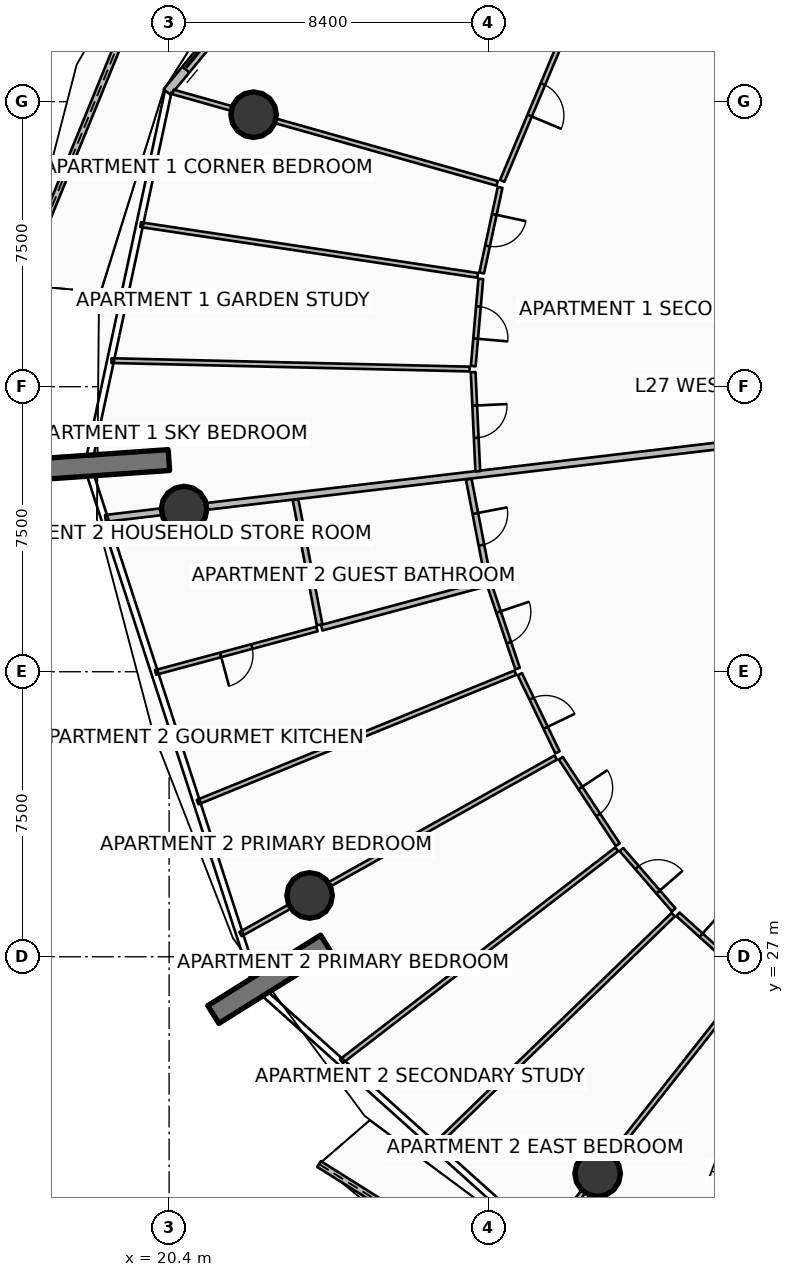
"""IFC4 building model, lengths in metres.
Left out: names, types, materials, properties, quantities, classifications, styles, units other than length and angle.
Written with IfcOpenShell. Run it as: python <this file> out.ifc"""

import sys

from ifc_helpers import new_model, si_unit, direction, frame, frame_2d, origin, origin_2d, place, context, subcontext, project, spatial, polyline, rectangle, circle, outline, extrude, element, fill, save


model = new_model("IFC4")
c1 = context("Model", 3, precision=1e-05, world=origin(), true_north=direction((0.0, 1.0)))
c2 = subcontext(c1, "Body", "Model", "MODEL_VIEW")
j1 = project(units=[si_unit("LENGTHUNIT", "METRE"), si_unit("PLANEANGLEUNIT", "RADIAN")], contexts=[c1])
p1 = place(None, origin())
s1 = spatial("IfcSite", under=j1, at=p1, CompositionType="ELEMENT")
p2 = place(p1, origin())
s2 = spatial("IfcBuilding", under=s1, at=p2, CompositionType="ELEMENT")
p3 = place(p2, frame((0.0, 0.0, 108.9)))
s3 = spatial("IfcBuildingStorey", under=s2, at=p3, CompositionType="ELEMENT", Elevation=108.9)
for number, where, z_axis, x_axis in (
    (1, (20.394, 40.07, 0.0), (0.0, 0.0, 1.0), (-0.998, -0.07, 0.0)),
    (2, (24.531, 27.335, 0.0), (0.0, 0.0, 1.0), (-0.848, -0.53, 0.0)),
):
    element("IfcWall", number, at=place(p3, frame(where, z_axis=z_axis, x_axis=x_axis)), inside=s3, PredefinedType="SOLIDWALL", context=c2, shape_type="SweptSolid", body=[
        extrude(rectangle(XDim=3.5, YDim=0.55, at=frame_2d((1.75, 0.0))), origin(), (0.0, 0.0, 1.0), 3.75),
    ])
for number, where, z_axis, x_axis in (
    (3, (22.623, 49.157, 0.0), (0.0, 0.0, 1.0), (1.0, 0.0, 0.0)),
    (4, (20.793, 38.78, 0.0), (0.0, 0.0, 1.0), (1.0, 0.0, 0.0)),
    (5, (24.097, 28.614, 0.0), (0.0, 0.0, 1.0), (1.0, 0.0, 0.0)),
    (6, (31.677, 21.294, 0.0), (0.0, 0.0, 1.0), (1.0, 0.0, 0.0)),
):
    element("IfcColumn", number, at=place(p3, frame(where, z_axis=z_axis, x_axis=x_axis)), inside=s3, PredefinedType="COLUMN", context=c2, shape_type="SweptSolid", body=[
        extrude(circle(Radius=0.6, at=origin_2d()), origin(), (0.0, 0.0, 1.0), 3.5),
    ])
p4 = place(p3, frame((20.954, 55.646, 0.0), z_axis=(0.0, 0.0, 1.0), x_axis=(-0.378274271274, -0.925693564681, 0.0)))
e7 = element("IfcWall", 7, at=p4, inside=s3, PredefinedType="PARAPET", context=c2, shape_type="SweptSolid", body=[
    extrude(outline(polyline([(0.0, 0.0), (11.852, 0.0), (11.852, 1.497), (5.926, 1.696), (0.0, 1.832), (0.0, 0.0)])), frame((0.0, 0.09, 0.0), z_axis=(0.0, -1.0, 0.0), x_axis=(1.0, 0.0, 0.0)), (0.0, 0.0, 1.0), 0.18),
])
p5 = place(p3, frame((24.345, 21.546, 0.0), z_axis=(0.0, 0.0, 1.0), x_axis=(0.846860965628, -0.531814351908, 0.0)))
e8 = element("IfcWall", 8, at=p5, inside=s3, PredefinedType="PARAPET", context=c2, shape_type="SweptSolid", body=[
    extrude(outline(polyline([(0.0, 0.0), (11.718, 0.0), (11.718, 1.632), (5.859, 1.418), (0.0, 1.233), (0.0, 0.0)])), frame((0.0, 0.09, 0.0), z_axis=(0.0, -1.0, 0.0), x_axis=(1.0, 0.0, 0.0)), (0.0, 0.0, 1.0), 0.18),
])
p6 = place(p3, frame((27.407, 58.298, 0.0), z_axis=(0.0, 0.0, 1.0), x_axis=(-0.636704975, -0.771107498868, 0.0)))
e9 = element("IfcWall", 9, at=p6, inside=s3, PredefinedType="SOLIDWALL", context=c2, shape_type="SweptSolid", body=[
    extrude(rectangle(XDim=11.084, YDim=0.24, at=frame_2d((5.542, 0.0))), origin(), (0.0, 0.0, 1.0), 2.45),
])
p7 = place(p6, frame((8.864, 0.0, 0.0)))
e10 = element("IfcOpeningElement", 10, at=p7, cuts=e9, PredefinedType="OPENING", context=c2, shape_type="SweptSolid", body=[
    extrude(rectangle(XDim=1.45, YDim=2.15, at=frame_2d((0.725, 1.075))), frame((0.0, 0.13, 0.0), z_axis=(0.0, -1.0, 0.0), x_axis=(1.0, 0.0, 0.0)), (0.0, 0.0, 1.0), 0.26),
])
p8 = place(p6, frame((0.28, 0.0, 0.65)))
e11 = element("IfcOpeningElement", 11, at=p8, cuts=e9, PredefinedType="OPENING", context=c2, shape_type="SweptSolid", body=[
    extrude(rectangle(XDim=1.6, YDim=1.5, at=frame_2d((0.8, 0.75))), frame((0.0, 0.13, 0.0), z_axis=(0.0, -1.0, 0.0), x_axis=(1.0, 0.0, 0.0)), (0.0, 0.0, 1.0), 0.26),
])
p9 = place(p3, frame((35.091, 40.472, 0.0), z_axis=(0.0, 0.0, 1.0), x_axis=(-0.99306845132, -0.117537445069, 0.0)))
e12 = element("IfcWall", 12, at=p9, inside=s3, PredefinedType="PARTITIONING", context=c2, shape_type="SweptSolid", body=[
    extrude(rectangle(XDim=16.48, YDim=0.18, at=frame_2d((8.24, 0.0))), origin(), (0.0, 0.0, 1.0), 2.94),
])
p10 = place(p3, frame((30.959, 51.682, 0.0), z_axis=(0.0, 0.0, 1.0), x_axis=(-0.387377754923, -0.921921078505, 0.0)))
e13 = element("IfcWall", 13, at=p10, inside=s3, PredefinedType="PARTITIONING", context=c2, shape_type="SweptSolid", body=[
    extrude(rectangle(XDim=4.628, YDim=0.125, at=frame_2d((2.314, 0.0))), origin(), (0.0, 0.0, 1.0), 2.94),
])
p11 = place(p10, frame((1.864, 0.0, 0.0)))
e14 = element("IfcOpeningElement", 14, at=p11, cuts=e13, PredefinedType="OPENING", context=c2, shape_type="SweptSolid", body=[
    extrude(rectangle(XDim=0.9, YDim=2.08, at=frame_2d((0.45, 1.04))), frame((0.0, 0.073, 0.0), z_axis=(0.0, -1.0, 0.0), x_axis=(1.0, 0.0, 0.0)), (0.0, 0.0, 1.0), 0.145),
])
p12 = place(p3, frame((29.031, 47.35, 0.0), z_axis=(0.0, 0.0, 1.0), x_axis=(-0.962455027906, 0.271441189317, 0.0)))
e15 = element("IfcWall", 15, at=p12, inside=s3, PredefinedType="PARTITIONING", context=c2, shape_type="SweptSolid", body=[
    extrude(rectangle(XDim=8.862, YDim=0.125, at=frame_2d((4.431, 0.0))), origin(), (0.0, 0.0, 1.0), 2.94),
])
p13 = place(p3, frame((28.52, 44.929, 0.0), z_axis=(0.0, 0.0, 1.0), x_axis=(-0.988886383278, 0.148673201912, 0.0)))
e16 = element("IfcWall", 16, at=p13, inside=s3, PredefinedType="PARTITIONING", context=c2, shape_type="SweptSolid", body=[
    extrude(rectangle(XDim=8.969, YDim=0.125, at=frame_2d((4.485, 0.0))), origin(), (0.0, 0.0, 1.0), 2.94),
])
p14 = place(p3, frame((28.306, 42.464, 0.0), z_axis=(0.0, 0.0, 1.0), x_axis=(-0.999722179252, 0.023570411771, 0.0)))
e17 = element("IfcWall", 17, at=p14, inside=s3, PredefinedType="PARTITIONING", context=c2, shape_type="SweptSolid", body=[
    extrude(rectangle(XDim=9.426, YDim=0.125, at=frame_2d((4.713, 0.0))), origin(), (0.0, 0.0, 1.0), 2.94),
])
p15 = place(p3, frame((29.11, 47.244, 0.0), z_axis=(0.0, 0.0, 1.0), x_axis=(-0.210470334655, -0.977600244594, 0.0)))
e18 = element("IfcWall", 18, at=p15, inside=s3, PredefinedType="PARTITIONING", context=c2, shape_type="SweptSolid", body=[
    extrude(rectangle(XDim=2.302, YDim=0.125, at=frame_2d((1.151, 0.0))), origin(), (0.0, 0.0, 1.0), 2.94),
])
p16 = place(p15, frame((0.726, 0.0, 0.0)))
e19 = element("IfcOpeningElement", 19, at=p16, cuts=e18, PredefinedType="OPENING", context=c2, shape_type="SweptSolid", body=[
    extrude(rectangle(XDim=0.85, YDim=2.06, at=frame_2d((0.425, 1.03))), frame((0.0, 0.073, 0.0), z_axis=(0.0, -1.0, 0.0), x_axis=(1.0, 0.0, 0.0)), (0.0, 0.0, 1.0), 0.145),
])
p17 = place(p3, frame((28.602, 44.836, 0.0), z_axis=(0.0, 0.0, 1.0), x_axis=(-0.086309330274, -0.996268387287, 0.0)))
e20 = element("IfcWall", 20, at=p17, inside=s3, PredefinedType="PARTITIONING", context=c2, shape_type="SweptSolid", body=[
    extrude(rectangle(XDim=2.302, YDim=0.125, at=frame_2d((1.151, 0.0))), origin(), (0.0, 0.0, 1.0), 2.94),
])
p18 = place(p17, frame((0.726, 0.0, 0.0)))
e21 = element("IfcOpeningElement", 21, at=p18, cuts=e20, PredefinedType="OPENING", context=c2, shape_type="SweptSolid", body=[
    extrude(rectangle(XDim=0.85, YDim=2.06, at=frame_2d((0.425, 1.03))), frame((0.0, 0.073, 0.0), z_axis=(0.0, -1.0, 0.0), x_axis=(1.0, 0.0, 0.0)), (0.0, 0.0, 1.0), 0.145),
])
p19 = place(p3, frame((28.4, 42.382, 0.0), z_axis=(0.0, 0.0, 1.0), x_axis=(0.047147361322, -0.998887944827, 0.0)))
e22 = element("IfcWall", 22, at=p19, inside=s3, PredefinedType="PARTITIONING", context=c2, shape_type="SweptSolid", body=[
    extrude(rectangle(XDim=2.61, YDim=0.125, at=frame_2d((1.305, 0.0))), origin(), (0.0, 0.0, 1.0), 2.94),
])
p20 = place(p19, frame((0.88, 0.0, 0.0)))
e23 = element("IfcOpeningElement", 23, at=p20, cuts=e22, PredefinedType="OPENING", context=c2, shape_type="SweptSolid", body=[
    extrude(rectangle(XDim=0.85, YDim=2.06, at=frame_2d((0.425, 1.03))), frame((0.0, 0.073, 0.0), z_axis=(0.0, -1.0, 0.0), x_axis=(1.0, 0.0, 0.0)), (0.0, 0.0, 1.0), 0.145),
])
p21 = place(p3, frame((28.285, 39.566, 0.0), z_axis=(0.0, 0.0, 1.0), x_axis=(0.189069796262, -0.98196365113, 0.0)))
e24 = element("IfcWall", 24, at=p21, inside=s3, PredefinedType="PARTITIONING", context=c2, shape_type="SweptSolid", body=[
    extrude(rectangle(XDim=2.687, YDim=0.15, at=frame_2d((1.344, 0.0))), origin(), (0.0, 0.0, 1.0), 2.94),
])
p22 = place(p21, frame((0.918, 0.0, 0.0)))
e25 = element("IfcOpeningElement", 25, at=p22, cuts=e24, PredefinedType="OPENING", context=c2, shape_type="SweptSolid", body=[
    extrude(rectangle(XDim=0.85, YDim=2.06, at=frame_2d((0.425, 1.03))), frame((0.0, 0.085, 0.0), z_axis=(0.0, -1.0, 0.0), x_axis=(1.0, 0.0, 0.0)), (0.0, 0.0, 1.0), 0.17),
])
p23 = place(p3, frame((23.727, 39.027, 0.0), z_axis=(0.0, 0.0, 1.0), x_axis=(0.189106762553, -0.981956532825, 0.0)))
e26 = element("IfcWall", 26, at=p23, inside=s3, PredefinedType="PARTITIONING", context=c2, shape_type="SweptSolid", body=[
    extrude(rectangle(XDim=3.352, YDim=0.15, at=frame_2d((1.676, 0.0))), origin(), (0.0, 0.0, 1.0), 2.94),
])
p24 = place(p3, frame((28.723, 36.816, 0.0), z_axis=(0.0, 0.0, 1.0), x_axis=(-0.965677569119, -0.259743782409, 0.0)))
e27 = element("IfcWall", 27, at=p24, inside=s3, PredefinedType="PARTITIONING", context=c2, shape_type="SweptSolid", body=[
    extrude(rectangle(XDim=4.46, YDim=0.15, at=frame_2d((2.23, 0.0))), origin(), (0.0, 0.0, 1.0), 2.94),
])
p25 = place(p3, frame((24.29, 35.624, 0.0), z_axis=(0.0, 0.0, 1.0), x_axis=(-0.965686463705, -0.259710711787, 0.0)))
e28 = element("IfcWall", 28, at=p25, inside=s3, PredefinedType="PARTITIONING", context=c2, shape_type="SweptSolid", body=[
    extrude(rectangle(XDim=4.398, YDim=0.125, at=frame_2d((2.199, 0.0))), origin(), (0.0, 0.0, 1.0), 2.94),
])
p26 = place(p25, frame((1.774, 0.0, 0.0)))
e29 = element("IfcOpeningElement", 29, at=p26, cuts=e28, PredefinedType="OPENING", context=c2, shape_type="SweptSolid", body=[
    extrude(rectangle(XDim=0.85, YDim=2.06, at=frame_2d((0.425, 1.03))), frame((0.0, 0.073, 0.0), z_axis=(0.0, -1.0, 0.0), x_axis=(1.0, 0.0, 0.0)), (0.0, 0.0, 1.0), 0.145),
])
p27 = place(p3, frame((29.511, 34.473, 0.0), z_axis=(0.0, 0.0, 1.0), x_axis=(-0.926185438401, -0.37706834088, 0.0)))
e30 = element("IfcWall", 30, at=p27, inside=s3, PredefinedType="PARTITIONING", context=c2, shape_type="SweptSolid", body=[
    extrude(rectangle(XDim=9.026, YDim=0.125, at=frame_2d((4.513, 0.0))), origin(), (0.0, 0.0, 1.0), 2.94),
])
p28 = place(p3, frame((28.838, 36.754, 0.0), z_axis=(0.0, 0.0, 1.0), x_axis=(0.31900826941, -0.947751931704, 0.0)))
e31 = element("IfcWall", 31, at=p28, inside=s3, PredefinedType="PARTITIONING", context=c2, shape_type="SweptSolid", body=[
    extrude(rectangle(XDim=2.291, YDim=0.125, at=frame_2d((1.145, 0.0))), origin(), (0.0, 0.0, 1.0), 2.94),
])
p29 = place(p28, frame((0.72, 0.0, 0.0)))
e32 = element("IfcOpeningElement", 32, at=p29, cuts=e31, PredefinedType="OPENING", context=c2, shape_type="SweptSolid", body=[
    extrude(rectangle(XDim=0.85, YDim=2.06, at=frame_2d((0.425, 1.03))), frame((0.0, 0.073, 0.0), z_axis=(0.0, -1.0, 0.0), x_axis=(1.0, 0.0, 0.0)), (0.0, 0.0, 1.0), 0.145),
])
p30 = place(p3, frame((29.629, 34.435, 0.0), z_axis=(0.0, 0.0, 1.0), x_axis=(0.433673987986, -0.901069848649, 0.0)))
e33 = element("IfcWall", 33, at=p30, inside=s3, PredefinedType="PARTITIONING", context=c2, shape_type="SweptSolid", body=[
    extrude(rectangle(XDim=2.281, YDim=0.125, at=frame_2d((1.14, 0.0))), origin(), (0.0, 0.0, 1.0), 2.94),
])
p31 = place(p30, frame((0.715, 0.0, 0.0)))
e34 = element("IfcOpeningElement", 34, at=p31, cuts=e33, PredefinedType="OPENING", context=c2, shape_type="SweptSolid", body=[
    extrude(rectangle(XDim=0.85, YDim=2.06, at=frame_2d((0.425, 1.03))), frame((0.0, 0.073, 0.0), z_axis=(0.0, -1.0, 0.0), x_axis=(1.0, 0.0, 0.0)), (0.0, 0.0, 1.0), 0.145),
])
p32 = place(p3, frame((30.575, 32.241, 0.0), z_axis=(0.0, 0.0, 1.0), x_axis=(-0.872502512898, -0.488609624328, 0.0)))
e35 = element("IfcWall", 35, at=p32, inside=s3, PredefinedType="PARTITIONING", context=c2, shape_type="SweptSolid", body=[
    extrude(rectangle(XDim=9.508, YDim=0.125, at=frame_2d((4.754, 0.0))), origin(), (0.0, 0.0, 1.0), 2.94),
])
p33 = place(p3, frame((32.179, 29.827, 0.0), z_axis=(0.0, 0.0, 1.0), x_axis=(-0.792545547833, -0.609812720932, 0.0)))
e36 = element("IfcWall", 36, at=p33, inside=s3, PredefinedType="PARTITIONING", context=c2, shape_type="SweptSolid", body=[
    extrude(rectangle(XDim=9.141, YDim=0.125, at=frame_2d((4.571, 0.0))), origin(), (0.0, 0.0, 1.0), 2.94),
])
p34 = place(p3, frame((33.665, 28.108, 0.0), z_axis=(0.0, 0.0, 1.0), x_axis=(-0.718119545748, -0.695919764064, 0.0)))
e37 = element("IfcWall", 37, at=p34, inside=s3, PredefinedType="PARTITIONING", context=c2, shape_type="SweptSolid", body=[
    extrude(rectangle(XDim=8.721, YDim=0.125, at=frame_2d((4.36, 0.0))), origin(), (0.0, 0.0, 1.0), 2.94),
])
p35 = place(p3, frame((30.706, 32.223, 0.0), z_axis=(0.0, 0.0, 1.0), x_axis=(0.550682420902, -0.834714844309, 0.0)))
e38 = element("IfcWall", 38, at=p35, inside=s3, PredefinedType="PARTITIONING", context=c2, shape_type="SweptSolid", body=[
    extrude(rectangle(XDim=2.725, YDim=0.125, at=frame_2d((1.362, 0.0))), origin(), (0.0, 0.0, 1.0), 2.94),
])
p36 = place(p35, frame((0.937, 0.0, 0.0)))
e39 = element("IfcOpeningElement", 39, at=p36, cuts=e38, PredefinedType="OPENING", context=c2, shape_type="SweptSolid", body=[
    extrude(rectangle(XDim=0.85, YDim=2.06, at=frame_2d((0.425, 1.03))), frame((0.0, 0.073, 0.0), z_axis=(0.0, -1.0, 0.0), x_axis=(1.0, 0.0, 0.0)), (0.0, 0.0, 1.0), 0.145),
])
p37 = place(p3, frame((32.302, 29.822, 0.0), z_axis=(0.0, 0.0, 1.0), x_axis=(0.653904073591, -0.756577466318, 0.0)))
e40 = element("IfcWall", 40, at=p37, inside=s3, PredefinedType="PARTITIONING", context=c2, shape_type="SweptSolid", body=[
    extrude(rectangle(XDim=2.102, YDim=0.125, at=frame_2d((1.051, 0.0))), origin(), (0.0, 0.0, 1.0), 2.94),
])
p38 = place(p37, frame((0.626, 0.0, 0.0)))
e41 = element("IfcOpeningElement", 41, at=p38, cuts=e40, PredefinedType="OPENING", context=c2, shape_type="SweptSolid", body=[
    extrude(rectangle(XDim=0.85, YDim=2.06, at=frame_2d((0.425, 1.03))), frame((0.0, 0.073, 0.0), z_axis=(0.0, -1.0, 0.0), x_axis=(1.0, 0.0, 0.0)), (0.0, 0.0, 1.0), 0.145),
])
p39 = place(p3, frame((33.789, 28.117, 0.0), z_axis=(0.0, 0.0, 1.0), x_axis=(0.742250438722, -0.670122590439, 0.0)))
e42 = element("IfcWall", 42, at=p39, inside=s3, PredefinedType="PARTITIONING", context=c2, shape_type="SweptSolid", body=[
    extrude(rectangle(XDim=2.491, YDim=0.125, at=frame_2d((1.246, 0.0))), origin(), (0.0, 0.0, 1.0), 2.94),
])
p40 = place(p39, frame((0.821, 0.0, 0.0)))
e43 = element("IfcOpeningElement", 43, at=p40, cuts=e42, PredefinedType="OPENING", context=c2, shape_type="SweptSolid", body=[
    extrude(rectangle(XDim=0.85, YDim=2.06, at=frame_2d((0.425, 1.03))), frame((0.0, 0.073, 0.0), z_axis=(0.0, -1.0, 0.0), x_axis=(1.0, 0.0, 0.0)), (0.0, 0.0, 1.0), 0.145),
])
p41 = place(p3, frame((35.635, 26.316, 0.0), z_axis=(0.0, 0.0, 1.0), x_axis=(-0.619089966413, -0.785320070727, 0.0)))
e44 = element("IfcWall", 44, at=p41, inside=s3, PredefinedType="PARTITIONING", context=c2, shape_type="SweptSolid", body=[
    extrude(rectangle(XDim=8.699, YDim=0.125, at=frame_2d((4.35, 0.0))), origin(), (0.0, 0.0, 1.0), 2.94),
])
p42 = place(p3, frame((38.028, 24.707, 0.0), z_axis=(0.0, 0.0, 1.0), x_axis=(-0.499570967342, -0.866272964249, 0.0)))
e45 = element("IfcWall", 45, at=p42, inside=s3, PredefinedType="PARTITIONING", context=c2, shape_type="SweptSolid", body=[
    extrude(rectangle(XDim=7.162, YDim=0.125, at=frame_2d((3.581, 0.0))), origin(), (0.0, 0.0, 1.0), 2.94),
])
p43 = place(p7, origin())
e46 = element("IfcDoor", 46, at=p43, inside=s3, OperationType="DOUBLE_DOOR_SLIDING", PredefinedType="DOOR", context=c2, shape_type="SweptSolid", body=[
    extrude(rectangle(XDim=1.45, YDim=2.15, at=frame_2d((0.725, 1.075))), frame((0.0, 0.025, 0.0), z_axis=(0.0, -1.0, 0.0), x_axis=(1.0, 0.0, 0.0)), (0.0, 0.0, 1.0), 0.05),
])
fill(e10, e46)
p44 = place(p11, origin())
e47 = element("IfcDoor", 47, at=p44, inside=s3, OperationType="SINGLE_SWING_RIGHT", PredefinedType="DOOR", context=c2, shape_type="SweptSolid", body=[
    extrude(rectangle(XDim=0.9, YDim=2.08, at=frame_2d((0.45, 1.04))), frame((0.0, 0.025, 0.0), z_axis=(0.0, -1.0, 0.0), x_axis=(1.0, 0.0, 0.0)), (0.0, 0.0, 1.0), 0.05),
])
fill(e14, e47)
p45 = place(p16, origin())
e48 = element("IfcDoor", 48, at=p45, inside=s3, OperationType="SINGLE_SWING_LEFT", PredefinedType="DOOR", context=c2, shape_type="SweptSolid", body=[
    extrude(rectangle(XDim=0.85, YDim=2.06, at=frame_2d((0.425, 1.03))), frame((0.0, 0.025, 0.0), z_axis=(0.0, -1.0, 0.0), x_axis=(1.0, 0.0, 0.0)), (0.0, 0.0, 1.0), 0.05),
])
fill(e19, e48)
p46 = place(p18, origin())
e49 = element("IfcDoor", 49, at=p46, inside=s3, OperationType="SINGLE_SWING_RIGHT", PredefinedType="DOOR", context=c2, shape_type="SweptSolid", body=[
    extrude(rectangle(XDim=0.85, YDim=2.06, at=frame_2d((0.425, 1.03))), frame((0.0, 0.025, 0.0), z_axis=(0.0, -1.0, 0.0), x_axis=(1.0, 0.0, 0.0)), (0.0, 0.0, 1.0), 0.05),
])
fill(e21, e49)
p47 = place(p20, origin())
e50 = element("IfcDoor", 50, at=p47, inside=s3, OperationType="SINGLE_SWING_LEFT", PredefinedType="DOOR", context=c2, shape_type="SweptSolid", body=[
    extrude(rectangle(XDim=0.85, YDim=2.06, at=frame_2d((0.425, 1.03))), frame((0.0, 0.025, 0.0), z_axis=(0.0, -1.0, 0.0), x_axis=(1.0, 0.0, 0.0)), (0.0, 0.0, 1.0), 0.05),
])
fill(e23, e50)
p48 = place(p22, origin())
e51 = element("IfcDoor", 51, at=p48, inside=s3, OperationType="SINGLE_SWING_LEFT", PredefinedType="DOOR", context=c2, shape_type="SweptSolid", body=[
    extrude(rectangle(XDim=0.85, YDim=2.06, at=frame_2d((0.425, 1.03))), frame((0.0, 0.025, 0.0), z_axis=(0.0, -1.0, 0.0), x_axis=(1.0, 0.0, 0.0)), (0.0, 0.0, 1.0), 0.05),
])
fill(e25, e51)
p49 = place(p26, origin())
e52 = element("IfcDoor", 52, at=p49, inside=s3, OperationType="SINGLE_SWING_RIGHT", PredefinedType="DOOR", context=c2, shape_type="SweptSolid", body=[
    extrude(rectangle(XDim=0.85, YDim=2.06, at=frame_2d((0.425, 1.03))), frame((0.0, 0.025, 0.0), z_axis=(0.0, -1.0, 0.0), x_axis=(1.0, 0.0, 0.0)), (0.0, 0.0, 1.0), 0.05),
])
fill(e29, e52)
p50 = place(p29, origin())
e53 = element("IfcDoor", 53, at=p50, inside=s3, OperationType="SINGLE_SWING_LEFT", PredefinedType="DOOR", context=c2, shape_type="SweptSolid", body=[
    extrude(rectangle(XDim=0.85, YDim=2.06, at=frame_2d((0.425, 1.03))), frame((0.0, 0.025, 0.0), z_axis=(0.0, -1.0, 0.0), x_axis=(1.0, 0.0, 0.0)), (0.0, 0.0, 1.0), 0.05),
])
fill(e32, e53)
p51 = place(p31, origin())
e54 = element("IfcDoor", 54, at=p51, inside=s3, OperationType="SINGLE_SWING_RIGHT", PredefinedType="DOOR", context=c2, shape_type="SweptSolid", body=[
    extrude(rectangle(XDim=0.85, YDim=2.06, at=frame_2d((0.425, 1.03))), frame((0.0, 0.025, 0.0), z_axis=(0.0, -1.0, 0.0), x_axis=(1.0, 0.0, 0.0)), (0.0, 0.0, 1.0), 0.05),
])
fill(e34, e54)
p52 = place(p36, origin())
e55 = element("IfcDoor", 55, at=p52, inside=s3, OperationType="SINGLE_SWING_LEFT", PredefinedType="DOOR", context=c2, shape_type="SweptSolid", body=[
    extrude(rectangle(XDim=0.85, YDim=2.06, at=frame_2d((0.425, 1.03))), frame((0.0, 0.025, 0.0), z_axis=(0.0, -1.0, 0.0), x_axis=(1.0, 0.0, 0.0)), (0.0, 0.0, 1.0), 0.05),
])
fill(e39, e55)
p53 = place(p38, origin())
e56 = element("IfcDoor", 56, at=p53, inside=s3, OperationType="SINGLE_SWING_RIGHT", PredefinedType="DOOR", context=c2, shape_type="SweptSolid", body=[
    extrude(rectangle(XDim=0.85, YDim=2.06, at=frame_2d((0.425, 1.03))), frame((0.0, 0.025, 0.0), z_axis=(0.0, -1.0, 0.0), x_axis=(1.0, 0.0, 0.0)), (0.0, 0.0, 1.0), 0.05),
])
fill(e41, e56)
p54 = place(p40, origin())
e57 = element("IfcDoor", 57, at=p54, inside=s3, OperationType="SINGLE_SWING_LEFT", PredefinedType="DOOR", context=c2, shape_type="SweptSolid", body=[
    extrude(rectangle(XDim=0.85, YDim=2.06, at=frame_2d((0.425, 1.03))), frame((0.0, 0.025, 0.0), z_axis=(0.0, -1.0, 0.0), x_axis=(1.0, 0.0, 0.0)), (0.0, 0.0, 1.0), 0.05),
])
fill(e43, e57)
save(model, sys.argv[1])
